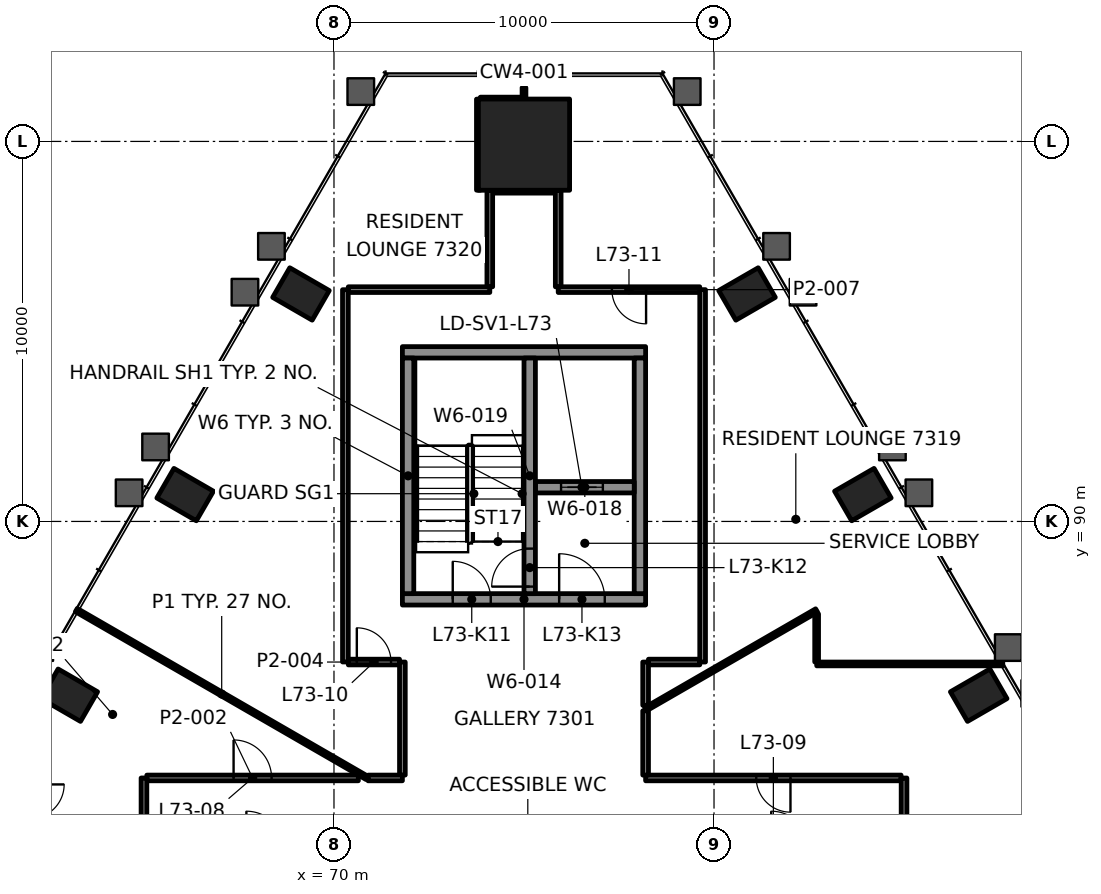
"""IFC4 building model, lengths in metres.
Left out: names, types, materials, properties, quantities, classifications, styles, units other than length and angle.
Written with IfcOpenShell. Run it as: python <this file> out.ifc"""

import sys

from ifc_helpers import new_model, si_unit, direction, frame, frame_2d, origin, origin_2d, place, context, subcontext, project, spatial, rectangle, hollow_rectangle, extrude, element, fill, save


model = new_model("IFC4")
c1 = context("Model", 3, precision=1e-05, world=origin(), true_north=direction((0.0, 1.0)))
c2 = subcontext(c1, "Body", "Model", "MODEL_VIEW")
j1 = project(units=[si_unit("LENGTHUNIT", "METRE"), si_unit("PLANEANGLEUNIT", "RADIAN")], contexts=[c1])
p1 = place(None, origin())
s1 = spatial("IfcSite", under=j1, at=p1, CompositionType="ELEMENT")
p2 = place(p1, origin())
s2 = spatial("IfcBuilding", under=s1, at=p2, CompositionType="ELEMENT")
p3 = place(p2, frame((0.0, 0.0, 302.1)))
s3 = spatial("IfcBuildingStorey", under=s2, at=p3, CompositionType="ELEMENT", Elevation=302.1)
p4 = place(p3, frame((75.0, 99.915, 0.0), z_axis=(0.0, 0.0, 1.0), x_axis=(-1.0, 0.0, 0.0)))
e1 = element("IfcColumn", 1, at=p4, inside=s3, PredefinedType="COLUMN", context=c2, shape_type="SweptSolid", body=[
    extrude(rectangle(XDim=2.4, YDim=2.4, at=origin_2d()), origin(), (0.0, 0.0, 1.0), 3.5),
])
for number, where, z_axis, x_axis in (
    (2, (86.965, 85.427, -0.0), (0.0, 0.0, 1.0), (-0.5, 0.866, 0.0)),
    (3, (83.917, 90.707, -0.0), (0.0, 0.0, 1.0), (-0.5, 0.866, 0.0)),
    (4, (80.869, 95.986, -0.0), (0.0, 0.0, 1.0), (-0.5, 0.866, 0.0)),
    (5, (69.131, 95.986, -0.0), (0.0, 0.0, 1.0), (-0.5, -0.866, 0.0)),
    (6, (66.083, 90.707, -0.0), (0.0, 0.0, 1.0), (-0.5, -0.866, 0.0)),
    (7, (63.035, 85.427, -0.0), (0.0, 0.0, 1.0), (-0.5, -0.866, 0.0)),
):
    element("IfcColumn", number, at=place(p3, frame(where, z_axis=z_axis, x_axis=x_axis)), inside=s3, PredefinedType="COLUMN", context=c2, shape_type="SweptSolid", body=[
        extrude(hollow_rectangle(XDim=0.9, YDim=1.2, WallThickness=0.06, at=origin_2d()), origin(), (0.0, 0.0, 1.0), 3.5),
    ])
p5 = place(p3, frame((71.8, 87.95, 0.0), z_axis=(0.0, 0.0, 1.0), x_axis=(1.0, 0.0, 0.0)))
e8 = element("IfcWall", 8, at=p5, inside=s3, PredefinedType="SHEAR", context=c2, shape_type="SweptSolid", body=[
    extrude(rectangle(XDim=6.4, YDim=0.3, at=frame_2d((3.2, 0.0))), origin(), (0.0, 0.0, 1.0), 3.3),
])
p6 = place(p5, frame((1.325, 0.0, 0.0)))
e9 = element("IfcOpeningElement", 9, at=p6, cuts=e8, PredefinedType="OPENING", context=c2, shape_type="SweptSolid", body=[
    extrude(rectangle(XDim=1.0, YDim=2.1, at=frame_2d((0.5, 1.05))), frame((0.0, 0.16, 0.0), z_axis=(0.0, -1.0, 0.0), x_axis=(1.0, 0.0, 0.0)), (0.0, 0.0, 1.0), 0.32),
])
p7 = place(p5, frame((4.125, 0.0, 0.0)))
e10 = element("IfcOpeningElement", 10, at=p7, cuts=e8, PredefinedType="OPENING", context=c2, shape_type="SweptSolid", body=[
    extrude(rectangle(XDim=1.2, YDim=2.1, at=frame_2d((0.6, 1.05))), frame((0.0, 0.16, 0.0), z_axis=(0.0, -1.0, 0.0), x_axis=(1.0, 0.0, 0.0)), (0.0, 0.0, 1.0), 0.32),
])
p8 = place(p3, frame((71.8, 94.45, 0.0), z_axis=(0.0, 0.0, 1.0), x_axis=(1.0, 0.0, 0.0)))
e11 = element("IfcWall", 11, at=p8, inside=s3, PredefinedType="SHEAR", context=c2, shape_type="SweptSolid", body=[
    extrude(rectangle(XDim=6.4, YDim=0.3, at=frame_2d((3.2, 0.0))), origin(), (0.0, 0.0, 1.0), 3.3),
])
for number, where, z_axis, x_axis in (
    (12, (71.95, 88.1, 0.0), (0.0, 0.0, 1.0), (0.0, 1.0, 0.0)),
    (13, (78.05, 88.1, 0.0), (0.0, 0.0, 1.0), (0.0, 1.0, 0.0)),
):
    element("IfcWall", number, at=place(p3, frame(where, z_axis=z_axis, x_axis=x_axis)), inside=s3, PredefinedType="SHEAR", context=c2, shape_type="SweptSolid", body=[
        extrude(rectangle(XDim=6.2, YDim=0.3, at=frame_2d((3.1, 0.0))), origin(), (0.0, 0.0, 1.0), 3.3),
    ])
p9 = place(p3, frame((75.3, 90.9, 0.0), z_axis=(0.0, 0.0, 1.0), x_axis=(1.0, 0.0, 0.0)))
e14 = element("IfcWall", 14, at=p9, inside=s3, PredefinedType="SHEAR", context=c2, shape_type="SweptSolid", body=[
    extrude(rectangle(XDim=2.6, YDim=0.3, at=frame_2d((1.3, 0.0))), origin(), (0.0, 0.0, 1.0), 3.3),
])
p10 = place(p9, frame((0.675, 0.0, 0.0)))
e15 = element("IfcOpeningElement", 15, at=p10, cuts=e14, PredefinedType="OPENING", context=c2, shape_type="SweptSolid", body=[
    extrude(rectangle(XDim=1.1, YDim=2.1, at=frame_2d((0.55, 1.05))), frame((0.0, 0.16, 0.0), z_axis=(0.0, -1.0, 0.0), x_axis=(1.0, 0.0, 0.0)), (0.0, 0.0, 1.0), 0.32),
])
p11 = place(p3, frame((75.15, 88.1, 0.0), z_axis=(0.0, 0.0, 1.0), x_axis=(0.0, 1.0, 0.0)))
e16 = element("IfcWall", 16, at=p11, inside=s3, PredefinedType="SHEAR", context=c2, shape_type="SweptSolid", body=[
    extrude(rectangle(XDim=6.2, YDim=0.3, at=frame_2d((3.1, 0.0))), origin(), (0.0, 0.0, 1.0), 3.3),
])
p12 = place(p11, frame((0.185, 0.0, 0.0)))
e17 = element("IfcOpeningElement", 17, at=p12, cuts=e16, PredefinedType="OPENING", context=c2, shape_type="SweptSolid", body=[
    extrude(rectangle(XDim=1.0, YDim=2.1, at=frame_2d((0.5, 1.05))), frame((0.0, 0.16, 0.0), z_axis=(0.0, -1.0, 0.0), x_axis=(1.0, 0.0, 0.0)), (0.0, 0.0, 1.0), 0.32),
])
p13 = place(p3, frame((65.075, 83.25, 0.0), z_axis=(0.0, 0.0, 1.0), x_axis=(1.0, 0.0, 0.0)))
e18 = element("IfcWall", 18, at=p13, inside=s3, PredefinedType="PARTITIONING", context=c2, shape_type="SweptSolid", body=[
    extrude(rectangle(XDim=5.565, YDim=0.15, at=frame_2d((2.783, 0.0))), origin(), (0.0, 0.0, 1.0), 2.7),
])
p14 = place(p13, frame((2.283, 0.0, 0.0)))
e19 = element("IfcOpeningElement", 19, at=p14, cuts=e18, PredefinedType="OPENING", context=c2, shape_type="SweptSolid", body=[
    extrude(rectangle(XDim=1.0, YDim=2.1, at=frame_2d((0.5, 1.05))), frame((0.0, 0.085, 0.0), z_axis=(0.0, -1.0, 0.0), x_axis=(1.0, 0.0, 0.0)), (0.0, 0.0, 1.0), 0.17),
])
p15 = place(p3, frame((84.923, 83.25, 0.0), z_axis=(0.0, 0.0, 1.0), x_axis=(-1.0, 0.0, 0.0)))
e20 = element("IfcWall", 20, at=p15, inside=s3, PredefinedType="PARTITIONING", context=c2, shape_type="SweptSolid", body=[
    extrude(rectangle(XDim=6.723, YDim=0.15, at=frame_2d((3.362, 0.0))), origin(), (0.0, 0.0, 1.0), 2.7),
])
p16 = place(p15, frame((2.911, 0.0, 0.0)))
e21 = element("IfcOpeningElement", 21, at=p16, cuts=e20, PredefinedType="OPENING", context=c2, shape_type="SweptSolid", body=[
    extrude(rectangle(XDim=0.9, YDim=2.1, at=frame_2d((0.45, 1.05))), frame((0.0, 0.085, 0.0), z_axis=(0.0, -1.0, 0.0), x_axis=(1.0, 0.0, 0.0)), (0.0, 0.0, 1.0), 0.17),
])
p17 = place(p3, frame((82.702, 86.25, 0.0), z_axis=(0.0, 0.0, 1.0), x_axis=(1.0, 0.0, 0.0)))
e22 = element("IfcWall", 22, at=p17, inside=s3, PredefinedType="PARTITIONING", context=c2, shape_type="SweptSolid", body=[
    extrude(rectangle(XDim=4.896, YDim=0.1, at=frame_2d((2.448, 0.0))), origin(), (0.0, 0.0, 1.0), 2.688),
])
p18 = place(p3, frame((70.377, 86.3, 0.0), z_axis=(0.0, 0.0, 1.0), x_axis=(1.0, 0.0, 0.0)))
e23 = element("IfcWall", 23, at=p18, inside=s3, PredefinedType="PARTITIONING", context=c2, shape_type="SweptSolid", body=[
    extrude(rectangle(XDim=1.348, YDim=0.15, at=frame_2d((0.674, 0.0))), origin(), (0.0, 0.0, 1.0), 2.7),
])
p19 = place(p18, frame((0.224, 0.0, 0.0)))
e24 = element("IfcOpeningElement", 24, at=p19, cuts=e23, PredefinedType="OPENING", context=c2, shape_type="SweptSolid", body=[
    extrude(rectangle(XDim=0.9, YDim=2.1, at=frame_2d((0.45, 1.05))), frame((0.0, 0.085, 0.0), z_axis=(0.0, -1.0, 0.0), x_axis=(1.0, 0.0, 0.0)), (0.0, 0.0, 1.0), 0.17),
])
p20 = place(p3, frame((78.275, 86.3, 0.0), z_axis=(0.0, 0.0, 1.0), x_axis=(1.0, 0.0, 0.0)))
e25 = element("IfcWall", 25, at=p20, inside=s3, PredefinedType="PARTITIONING", context=c2, shape_type="SweptSolid", body=[
    extrude(rectangle(XDim=1.35, YDim=0.15, at=frame_2d((0.675, 0.0))), origin(), (0.0, 0.0, 1.0), 2.7),
])
p21 = place(p3, frame((70.377, 96.1, 0.0), z_axis=(0.0, 0.0, 1.0), x_axis=(1.0, 0.0, 0.0)))
e26 = element("IfcWall", 26, at=p21, inside=s3, PredefinedType="PARTITIONING", context=c2, shape_type="SweptSolid", body=[
    extrude(rectangle(XDim=3.723, YDim=0.15, at=frame_2d((1.861, 0.0))), origin(), (0.0, 0.0, 1.0), 2.7),
])
p22 = place(p3, frame((79.625, 96.1, 0.0), z_axis=(0.0, 0.0, 1.0), x_axis=(-1.0, 0.0, 0.0)))
e27 = element("IfcWall", 27, at=p22, inside=s3, PredefinedType="PARTITIONING", context=c2, shape_type="SweptSolid", body=[
    extrude(rectangle(XDim=3.724, YDim=0.15, at=frame_2d((1.862, 0.0))), origin(), (0.0, 0.0, 1.0), 2.7),
])
p23 = place(p22, frame((1.412, 0.0, 0.0)))
e28 = element("IfcOpeningElement", 28, at=p23, cuts=e27, PredefinedType="OPENING", context=c2, shape_type="SweptSolid", body=[
    extrude(rectangle(XDim=0.9, YDim=2.1, at=frame_2d((0.45, 1.05))), frame((0.0, 0.085, 0.0), z_axis=(0.0, -1.0, 0.0), x_axis=(1.0, 0.0, 0.0)), (0.0, 0.0, 1.0), 0.17),
])
p24 = place(p3, frame((74.182, 98.715, 0.0), z_axis=(0.0, 0.0, 1.0), x_axis=(1.0, 0.0, 0.0)))
e29 = element("IfcWall", 29, at=p24, inside=s3, PredefinedType="PARTITIONING", context=c2, shape_type="SweptSolid", body=[
    extrude(rectangle(XDim=1.642, YDim=0.15, at=frame_2d((0.821, 0.0))), origin(), (0.0, 0.0, 1.0), 2.697),
])
p25 = place(p3, frame((73.852, 101.115, 0.0), z_axis=(0.0, 0.0, 1.0), x_axis=(1.0, 0.0, 0.0)))
e30 = element("IfcWall", 30, at=p25, inside=s3, PredefinedType="PARTITIONING", context=c2, shape_type="SweptSolid", body=[
    extrude(rectangle(XDim=1.148, YDim=0.1, at=frame_2d((0.574, 0.0))), origin(), (0.0, 0.0, 1.0), 2.7),
])
p26 = place(p3, frame((78.2, 85.06, 0.0), z_axis=(0.0, 0.0, 1.0), x_axis=(0.866025161861, 0.500000419024, 0.0)))
e31 = element("IfcWall", 31, at=p26, inside=s3, PredefinedType="PARTITIONING", context=c2, shape_type="SweptSolid", body=[
    extrude(rectangle(XDim=5.195, YDim=0.1, at=frame_2d((2.598, 0.0))), origin(), (0.0, 0.0, 1.0), 2.7),
])
p27 = place(p3, frame((85.0, 70.266, 0.0), z_axis=(0.0, 0.0, 1.0), x_axis=(0.0, 1.0, 0.0)))
e32 = element("IfcWall", 32, at=p27, inside=s3, PredefinedType="PARTITIONING", context=c2, shape_type="SweptSolid", body=[
    extrude(rectangle(XDim=12.982, YDim=0.15, at=frame_2d((6.491, 0.0))), origin(), (0.0, 0.0, 1.0), 2.7),
])
p28 = place(p3, frame((82.7, 86.302, 0.0), z_axis=(0.0, 0.0, 1.0), x_axis=(0.0, 1.0, 0.0)))
e33 = element("IfcWall", 33, at=p28, inside=s3, PredefinedType="PARTITIONING", context=c2, shape_type="SweptSolid", body=[
    extrude(rectangle(XDim=1.267, YDim=0.1, at=frame_2d((0.634, 0.0))), origin(), (0.0, 0.0, 1.0), 2.7),
])
p29 = place(p3, frame((79.7, 86.301, 0.0), z_axis=(0.0, 0.0, 1.0), x_axis=(0.0, 1.0, 0.0)))
e34 = element("IfcWall", 34, at=p29, inside=s3, PredefinedType="PARTITIONING", context=c2, shape_type="SweptSolid", body=[
    extrude(rectangle(XDim=9.799, YDim=0.15, at=frame_2d((4.899, 0.0))), origin(), (0.0, 0.0, 1.0), 2.7),
])
p30 = place(p3, frame((78.2, 83.325, 0.0), z_axis=(0.0, 0.0, 1.0), x_axis=(0.0, 1.0, 0.0)))
e35 = element("IfcWall", 35, at=p30, inside=s3, PredefinedType="PARTITIONING", context=c2, shape_type="SweptSolid", body=[
    extrude(rectangle(XDim=1.692, YDim=0.15, at=frame_2d((0.846, 0.0))), origin(), (0.0, 0.0, 1.0), 2.7),
])
p31 = place(p3, frame((75.9, 96.175, 0.0), z_axis=(0.0, 0.0, 1.0), x_axis=(0.0, 1.0, 0.0)))
e36 = element("IfcWall", 36, at=p31, inside=s3, PredefinedType="PARTITIONING", context=c2, shape_type="SweptSolid", body=[
    extrude(rectangle(XDim=2.54, YDim=0.15, at=frame_2d((1.27, 0.0))), origin(), (0.0, 0.0, 1.0), 2.7),
])
p32 = place(p3, frame((75.0, 101.165, 0.0), z_axis=(0.0, 0.0, 1.0), x_axis=(0.0, 1.0, 0.0)))
e37 = element("IfcWall", 37, at=p32, inside=s3, PredefinedType="PARTITIONING", context=c2, shape_type="SweptSolid", body=[
    extrude(rectangle(XDim=0.25, YDim=0.1, at=frame_2d((0.125, 0.0))), origin(), (0.0, 0.0, 1.0), 2.7),
])
p33 = place(p3, frame((74.1, 96.175, 0.0), z_axis=(0.0, 0.0, 1.0), x_axis=(0.0, 1.0, 0.0)))
e38 = element("IfcWall", 38, at=p33, inside=s3, PredefinedType="PARTITIONING", context=c2, shape_type="SweptSolid", body=[
    extrude(rectangle(XDim=2.54, YDim=0.15, at=frame_2d((1.27, 0.0))), origin(), (0.0, 0.0, 1.0), 2.7),
])
p34 = place(p3, frame((73.8, 98.717, 0.0), z_axis=(0.0, 0.0, 1.0), x_axis=(0.0, 1.0, 0.0)))
e39 = element("IfcWall", 39, at=p34, inside=s3, PredefinedType="PARTITIONING", context=c2, shape_type="SweptSolid", body=[
    extrude(rectangle(XDim=2.396, YDim=0.1, at=frame_2d((1.198, 0.0))), origin(), (0.0, 0.0, 1.0), 2.7),
])
p35 = place(p3, frame((71.8, 83.325, 0.0), z_axis=(0.0, 0.0, 1.0), x_axis=(0.0, 1.0, 0.0)))
e40 = element("IfcWall", 40, at=p35, inside=s3, PredefinedType="PARTITIONING", context=c2, shape_type="SweptSolid", body=[
    extrude(rectangle(XDim=2.975, YDim=0.15, at=frame_2d((1.488, 0.0))), origin(), (0.0, 0.0, 1.0), 2.7),
])
p36 = place(p3, frame((70.3, 86.302, 0.0), z_axis=(0.0, 0.0, 1.0), x_axis=(0.0, 1.0, 0.0)))
e41 = element("IfcWall", 41, at=p36, inside=s3, PredefinedType="PARTITIONING", context=c2, shape_type="SweptSolid", body=[
    extrude(rectangle(XDim=9.796, YDim=0.15, at=frame_2d((4.898, 0.0))), origin(), (0.0, 0.0, 1.0), 2.7),
])
p37 = place(p3, frame((65.0, 70.266, 0.0), z_axis=(0.0, 0.0, 1.0), x_axis=(0.0, 1.0, 0.0)))
e42 = element("IfcWall", 42, at=p37, inside=s3, PredefinedType="PARTITIONING", context=c2, shape_type="SweptSolid", body=[
    extrude(rectangle(XDim=12.984, YDim=0.15, at=frame_2d((6.492, 0.0))), origin(), (0.0, 0.0, 1.0), 2.7),
])
p38 = place(p3, frame((70.871, 83.25, 0.0), z_axis=(0.0, 0.0, 1.0), x_axis=(-0.866018527528, 0.500011909837, 0.0)))
e43 = element("IfcWall", 43, at=p38, inside=s3, PredefinedType="PARTITIONING", context=c2, shape_type="SweptSolid", body=[
    extrude(rectangle(XDim=8.834, YDim=0.1, at=frame_2d((4.417, 0.0))), origin(), (0.0, 0.0, 1.0), 2.688),
])
p39 = place(p3, frame((70.896, 83.25, 0.0), z_axis=(0.0, 0.0, 1.0), x_axis=(1.0, 0.0, 0.0)))
e44 = element("IfcWall", 44, at=p39, inside=s3, PredefinedType="PARTITIONING", context=c2, shape_type="SweptSolid", body=[
    extrude(rectangle(XDim=0.905, YDim=0.15, at=frame_2d((0.452, 0.0))), origin(), (0.0, 0.0, 1.0), 2.7),
])
p40 = place(p3, frame((78.2, 85.161, 0.0), z_axis=(0.0, 0.0, 1.0), x_axis=(0.0, 1.0, 0.0)))
e45 = element("IfcWall", 45, at=p40, inside=s3, PredefinedType="PARTITIONING", context=c2, shape_type="SweptSolid", body=[
    extrude(rectangle(XDim=1.139, YDim=0.15, at=frame_2d((0.57, 0.0))), origin(), (0.0, 0.0, 1.0), 2.7),
])
p41 = place(p14, origin())
e46 = element("IfcDoor", 46, at=p41, inside=s3, OperationType="SINGLE_SWING_RIGHT", PredefinedType="DOOR", context=c2, shape_type="SweptSolid", body=[
    extrude(rectangle(XDim=1.0, YDim=2.1, at=frame_2d((0.5, 1.05))), frame((0.0, 0.025, 0.0), z_axis=(0.0, -1.0, 0.0), x_axis=(1.0, 0.0, 0.0)), (0.0, 0.0, 1.0), 0.05),
])
fill(e19, e46)
p42 = place(p16, origin())
e47 = element("IfcDoor", 47, at=p42, inside=s3, OperationType="SINGLE_SWING_RIGHT", PredefinedType="DOOR", context=c2, shape_type="SweptSolid", body=[
    extrude(rectangle(XDim=0.9, YDim=2.1, at=frame_2d((0.45, 1.05))), frame((0.0, 0.025, 0.0), z_axis=(0.0, -1.0, 0.0), x_axis=(1.0, 0.0, 0.0)), (0.0, 0.0, 1.0), 0.05),
])
fill(e21, e47)
p43 = place(p19, origin())
e48 = element("IfcDoor", 48, at=p43, inside=s3, OperationType="SINGLE_SWING_LEFT", PredefinedType="DOOR", context=c2, shape_type="SweptSolid", body=[
    extrude(rectangle(XDim=0.9, YDim=2.1, at=frame_2d((0.45, 1.05))), frame((0.0, 0.025, 0.0), z_axis=(0.0, -1.0, 0.0), x_axis=(1.0, 0.0, 0.0)), (0.0, 0.0, 1.0), 0.05),
])
fill(e24, e48)
p44 = place(p23, origin())
e49 = element("IfcDoor", 49, at=p44, inside=s3, OperationType="SINGLE_SWING_LEFT", PredefinedType="DOOR", context=c2, shape_type="SweptSolid", body=[
    extrude(rectangle(XDim=0.9, YDim=2.1, at=frame_2d((0.45, 1.05))), frame((0.0, 0.025, 0.0), z_axis=(0.0, -1.0, 0.0), x_axis=(1.0, 0.0, 0.0)), (0.0, 0.0, 1.0), 0.05),
])
fill(e28, e49)
p45 = place(p10, origin())
e50 = element("IfcDoor", 50, at=p45, inside=s3, OperationType="DOUBLE_DOOR_SLIDING", PredefinedType="DOOR", context=c2, shape_type="SweptSolid", body=[
    extrude(rectangle(XDim=1.1, YDim=2.1, at=frame_2d((0.55, 1.05))), frame((0.0, 0.025, 0.0), z_axis=(0.0, -1.0, 0.0), x_axis=(1.0, 0.0, 0.0)), (0.0, 0.0, 1.0), 0.05),
])
fill(e15, e50)
p46 = place(p6, origin())
e51 = element("IfcDoor", 51, at=p46, inside=s3, OperationType="SINGLE_SWING_RIGHT", PredefinedType="DOOR", context=c2, shape_type="SweptSolid", body=[
    extrude(rectangle(XDim=1.0, YDim=2.1, at=frame_2d((0.5, 1.05))), frame((0.0, 0.025, 0.0), z_axis=(0.0, -1.0, 0.0), x_axis=(1.0, 0.0, 0.0)), (0.0, 0.0, 1.0), 0.05),
])
fill(e9, e51)
p47 = place(p12, origin())
e52 = element("IfcDoor", 52, at=p47, inside=s3, OperationType="SINGLE_SWING_LEFT", PredefinedType="DOOR", context=c2, shape_type="SweptSolid", body=[
    extrude(rectangle(XDim=1.0, YDim=2.1, at=frame_2d((0.5, 1.05))), frame((0.0, 0.025, 0.0), z_axis=(0.0, -1.0, 0.0), x_axis=(1.0, 0.0, 0.0)), (0.0, 0.0, 1.0), 0.05),
])
fill(e17, e52)
p48 = place(p7, origin())
e53 = element("IfcDoor", 53, at=p48, inside=s3, OperationType="SINGLE_SWING_RIGHT", PredefinedType="DOOR", context=c2, shape_type="SweptSolid", body=[
    extrude(rectangle(XDim=1.2, YDim=2.1, at=frame_2d((0.6, 1.05))), frame((0.0, 0.025, 0.0), z_axis=(0.0, -1.0, 0.0), x_axis=(1.0, 0.0, 0.0)), (0.0, 0.0, 1.0), 0.05),
])
fill(e10, e53)
save(model, sys.argv[1])
